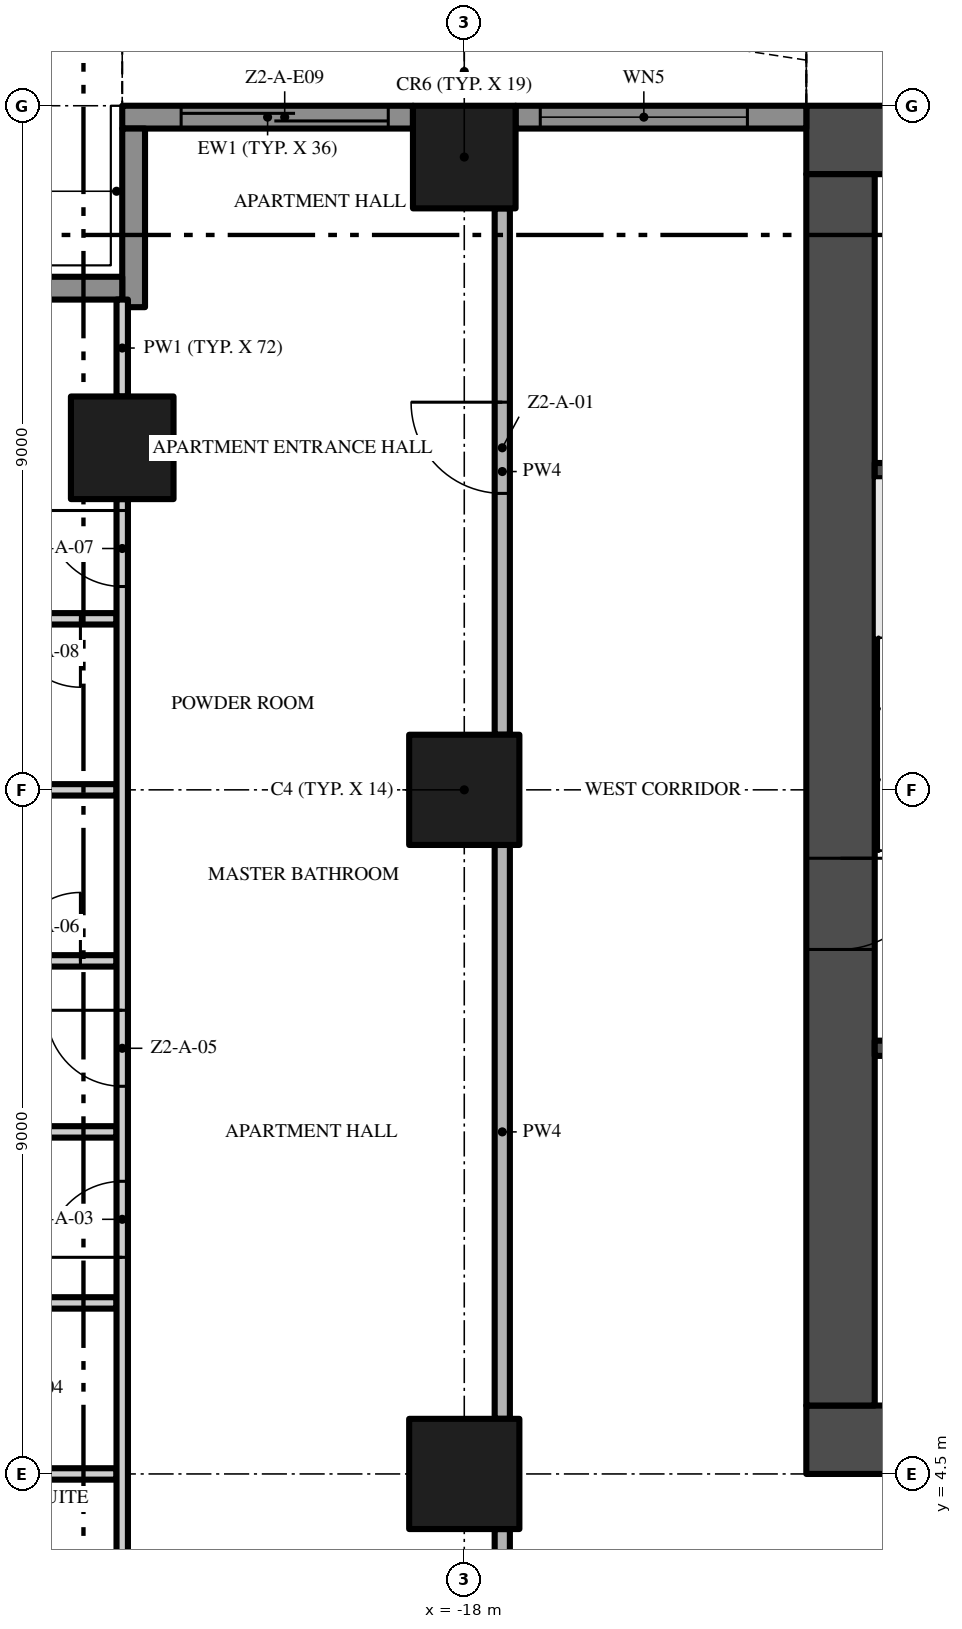
"""IFC4 building model, lengths in metres.
Left out: names, types, materials, properties, quantities, classifications, styles, units other than length and angle.
Written with IfcOpenShell. Run it as: python <this file> out.ifc"""

import sys

from ifc_helpers import new_model, si_unit, direction, frame, frame_2d, origin, origin_2d, place, context, subcontext, project, spatial, polyline, rectangle, outline, extrude, element, fill, save


model = new_model("IFC4")
c1 = context("Model", 3, precision=1e-05, world=origin(), true_north=direction((0.0, 1.0)))
c2 = subcontext(c1, "Body", "Model", "MODEL_VIEW")
j1 = project(units=[si_unit("LENGTHUNIT", "METRE"), si_unit("PLANEANGLEUNIT", "RADIAN")], contexts=[c1])
p1 = place(None, origin())
s1 = spatial("IfcSite", under=j1, at=p1, CompositionType="ELEMENT")
p2 = place(p1, origin())
s2 = spatial("IfcBuilding", under=s1, at=p2, CompositionType="ELEMENT")
p3 = place(p2, frame((0.0, 0.0, 69.4)))
s3 = spatial("IfcBuildingStorey", under=s2, at=p3, CompositionType="ELEMENT", Elevation=69.4)
p4 = place(p3, frame((-13.5, 4.95, -0.3), z_axis=(0.0, 0.0, 1.0), x_axis=(1.0, 0.0, 0.0)))
e1 = element("IfcWall", 1, at=p4, inside=s3, PredefinedType="SHEAR", context=c2, shape_type="SweptSolid", body=[
    extrude(rectangle(XDim=27.0, YDim=0.9, at=frame_2d((13.5, 0.0))), origin(), (0.0, 0.0, 1.0), 3.8),
])
p5 = place(p4, frame((12.0, 0.0, 0.3)))
e2 = element("IfcOpeningElement", 2, at=p5, cuts=e1, PredefinedType="OPENING", context=c2, shape_type="SweptSolid", body=[
    extrude(rectangle(XDim=3.0, YDim=2.4, at=frame_2d((1.5, 1.2))), frame((0.0, 0.46, 0.0), z_axis=(0.0, -1.0, 0.0), x_axis=(1.0, 0.0, 0.0)), (0.0, 0.0, 1.0), 0.92),
])
p6 = place(p4, frame((4.9, 0.0, 0.3)))
e3 = element("IfcOpeningElement", 3, at=p6, cuts=e1, PredefinedType="OPENING", context=c2, shape_type="SweptSolid", body=[
    extrude(rectangle(XDim=1.2, YDim=2.2, at=frame_2d((0.6, 1.1))), frame((0.0, 0.46, 0.0), z_axis=(0.0, -1.0, 0.0), x_axis=(1.0, 0.0, 0.0)), (0.0, 0.0, 1.0), 0.92),
])
p7 = place(p4, frame((20.75, 0.0, 0.3)))
e4 = element("IfcOpeningElement", 4, at=p7, cuts=e1, PredefinedType="OPENING", context=c2, shape_type="SweptSolid", body=[
    extrude(rectangle(XDim=1.5, YDim=2.2, at=frame_2d((0.75, 1.1))), frame((0.0, 0.46, 0.0), z_axis=(0.0, -1.0, 0.0), x_axis=(1.0, 0.0, 0.0)), (0.0, 0.0, 1.0), 0.92),
])
p8 = place(p4, frame((17.4, 0.0, 0.3)))
e5 = element("IfcOpeningElement", 5, at=p8, cuts=e1, PredefinedType="OPENING", context=c2, shape_type="SweptSolid", body=[
    extrude(rectangle(XDim=1.2, YDim=2.2, at=frame_2d((0.6, 1.1))), frame((0.0, 0.46, 0.0), z_axis=(0.0, -1.0, 0.0), x_axis=(1.0, 0.0, 0.0)), (0.0, 0.0, 1.0), 0.92),
])
p9 = place(p3, frame((13.5, 22.05, -0.3), z_axis=(0.0, 0.0, 1.0), x_axis=(-1.0, 0.0, 0.0)))
e6 = element("IfcWall", 6, at=p9, inside=s3, PredefinedType="SHEAR", context=c2, shape_type="SweptSolid", body=[
    extrude(rectangle(XDim=27.0, YDim=0.9, at=frame_2d((13.5, 0.0))), origin(), (0.0, 0.0, 1.0), 3.8),
])
p10 = place(p3, frame((-13.05, 21.6, -0.3), z_axis=(0.0, 0.0, 1.0), x_axis=(0.0, -1.0, 0.0)))
e7 = element("IfcWall", 7, at=p10, inside=s3, PredefinedType="SHEAR", context=c2, shape_type="SweptSolid", body=[
    extrude(rectangle(XDim=16.2, YDim=0.9, at=frame_2d((8.1, 0.0))), origin(), (0.0, 0.0, 1.0), 3.8),
])
p11 = place(p10, frame((9.0, 0.0, 0.3)))
e8 = element("IfcOpeningElement", 8, at=p11, cuts=e7, PredefinedType="OPENING", context=c2, shape_type="SweptSolid", body=[
    extrude(rectangle(XDim=1.2, YDim=2.2, at=frame_2d((0.6, 1.1))), frame((0.0, 0.46, 0.0), z_axis=(0.0, -1.0, 0.0), x_axis=(1.0, 0.0, 0.0)), (0.0, 0.0, 1.0), 0.92),
])
p12 = place(p3, frame((-18.0, 13.5, 0.0), z_axis=(0.0, 0.0, 1.0), x_axis=(1.0, 0.0, 0.0)))
e9 = element("IfcColumn", 9, at=p12, inside=s3, PredefinedType="COLUMN", context=c2, shape_type="SweptSolid", body=[
    extrude(rectangle(XDim=1.45, YDim=1.45, at=origin_2d()), origin(), (0.0, 0.0, 1.0), 3.5),
])
p13 = place(p3, frame((-18.0, 21.825, 0.0), z_axis=(0.0, 0.0, 1.0), x_axis=(1.0, 0.0, 0.0)))
e10 = element("IfcColumn", 10, at=p13, inside=s3, PredefinedType="COLUMN", context=c2, shape_type="SweptSolid", body=[
    extrude(rectangle(XDim=1.35, YDim=1.35, at=origin_2d()), origin(), (0.0, 0.0, 1.0), 3.5),
])
p14 = place(p3, frame((-18.0, 4.5, 0.0), z_axis=(0.0, 0.0, 1.0), x_axis=(1.0, 0.0, 0.0)))
e11 = element("IfcColumn", 11, at=p14, inside=s3, PredefinedType="COLUMN", context=c2, shape_type="SweptSolid", body=[
    extrude(rectangle(XDim=1.45, YDim=1.45, at=origin_2d()), origin(), (0.0, 0.0, 1.0), 3.5),
])
p15 = place(p3, frame((-22.5, 18.0, 0.0), z_axis=(0.0, 0.0, 1.0), x_axis=(1.0, 0.0, 0.0)))
e12 = element("IfcColumn", 12, at=p15, inside=s3, PredefinedType="COLUMN", context=c2, shape_type="SweptSolid", body=[
    extrude(rectangle(XDim=1.35, YDim=1.35, at=origin_2d()), origin(), (0.0, 0.0, 1.0), 3.5),
])
p16 = place(p3, frame((-17.325, 22.35, 0.0), z_axis=(0.0, 0.0, 1.0), x_axis=(1.0, 0.0, 0.0)))
e13 = element("IfcWall", 13, at=p16, inside=s3, PredefinedType="SOLIDWALL", context=c2, shape_type="SweptSolid", body=[
    extrude(rectangle(XDim=3.825, YDim=0.3, at=frame_2d((1.913, 0.0))), origin(), (0.0, 0.0, 1.0), 3.5),
])
p17 = place(p16, frame((0.325, 0.0, 0.45)))
e14 = element("IfcOpeningElement", 14, at=p17, cuts=e13, PredefinedType="OPENING", context=c2, shape_type="SweptSolid", body=[
    extrude(rectangle(XDim=2.725, YDim=2.65, at=frame_2d((1.363, 1.325))), frame((0.0, 0.16, 0.0), z_axis=(0.0, -1.0, 0.0), x_axis=(1.0, 0.0, 0.0)), (0.0, 0.0, 1.0), 0.32),
])
p18 = place(p3, frame((-22.5, 22.35, 0.0), z_axis=(0.0, 0.0, 1.0), x_axis=(1.0, 0.0, 0.0)))
e15 = element("IfcWall", 15, at=p18, inside=s3, PredefinedType="SOLIDWALL", context=c2, shape_type="SweptSolid", body=[
    extrude(rectangle(XDim=3.825, YDim=0.3, at=frame_2d((1.913, 0.0))), origin(), (0.0, 0.0, 1.0), 3.5),
])
p19 = place(p18, frame((0.775, 0.0, 0.0)))
e16 = element("IfcOpeningElement", 16, at=p19, cuts=e15, PredefinedType="OPENING", context=c2, shape_type="SweptSolid", body=[
    extrude(rectangle(XDim=2.725, YDim=2.4, at=frame_2d((1.363, 1.2))), frame((0.0, 0.16, 0.0), z_axis=(0.0, -1.0, 0.0), x_axis=(1.0, 0.0, 0.0)), (0.0, 0.0, 1.0), 0.32),
])
p20 = place(p3, frame((-22.35, 19.85, 0.0), z_axis=(0.0, 0.0, 1.0), x_axis=(0.0, 1.0, 0.0)))
e17 = element("IfcWall", 17, at=p20, inside=s3, PredefinedType="SOLIDWALL", context=c2, shape_type="SweptSolid", body=[
    extrude(rectangle(XDim=2.35, YDim=0.3, at=frame_2d((1.175, 0.0))), origin(), (0.0, 0.0, 1.0), 3.5),
])
p21 = place(p3, frame((-24.75, 20.1, 0.0), z_axis=(0.0, 0.0, 1.0), x_axis=(1.0, 0.0, 0.0)))
e18 = element("IfcWall", 18, at=p21, inside=s3, PredefinedType="SOLIDWALL", context=c2, shape_type="SweptSolid", body=[
    extrude(rectangle(XDim=2.25, YDim=0.3, at=frame_2d((1.125, 0.0))), origin(), (0.0, 0.0, 1.0), 3.5),
])
p22 = place(p3, origin())
e19 = element("IfcWall", 19, at=p22, inside=s3, PredefinedType="USERDEFINED", context=c2, shape_type="SweptSolid", body=[
    extrude(outline(polyline([(-13.5, 23.1), (-15.0, 23.329), (-16.5, 23.929), (-18.0, 24.671), (-19.5, 25.271), (-21.0, 25.5), (-22.5, 25.271), (-22.462, 25.024), (-21.0, 25.247), (-19.566, 25.028), (-18.102, 24.442), (-16.602, 23.701), (-15.066, 23.086), (-13.538, 22.853), (-13.5, 23.1)])), origin(), (0.0, 0.0, 1.0), 0.9),
])
for number, where, z_axis, x_axis in (
    (20, (-12.6, 10.1, 0.0), (0.0, 0.0, 1.0), (1.0, 0.0, 0.0)),
    (21, (-12.6, 17.7, 0.0), (0.0, 0.0, 1.0), (1.0, 0.0, 0.0)),
):
    element("IfcWall", number, at=place(p3, frame(where, z_axis=z_axis, x_axis=x_axis)), inside=s3, PredefinedType="SHEAR", context=c2, shape_type="SweptSolid", body=[
        extrude(rectangle(XDim=2.95, YDim=0.2, at=frame_2d((1.475, 0.0))), origin(), (0.0, 0.0, 1.0), 3.5),
    ])
p23 = place(p3, frame((-25.65, 4.5, 0.0), z_axis=(0.0, 0.0, 1.0), x_axis=(1.0, 0.0, 0.0)))
e22 = element("IfcWall", 22, at=p23, inside=s3, PredefinedType="PARTITIONING", context=c2, shape_type="SweptSolid", body=[
    extrude(rectangle(XDim=3.075, YDim=0.15, at=frame_2d((1.538, 0.0))), origin(), (0.0, 0.0, 1.0), 3.5),
])
p24 = place(p3, frame((-24.45, 6.75, 0.0), z_axis=(0.0, 0.0, 1.0), x_axis=(1.0, 0.0, 0.0)))
e23 = element("IfcWall", 23, at=p24, inside=s3, PredefinedType="PARTITIONING", context=c2, shape_type="SweptSolid", body=[
    extrude(rectangle(XDim=1.875, YDim=0.15, at=frame_2d((0.938, 0.0))), origin(), (0.0, 0.0, 1.0), 3.5),
])
p25 = place(p3, frame((-26.7, 9.0, 0.0), z_axis=(0.0, 0.0, 1.0), x_axis=(1.0, 0.0, 0.0)))
e24 = element("IfcWall", 24, at=p25, inside=s3, PredefinedType="PARTITIONING", context=c2, shape_type="SweptSolid", body=[
    extrude(rectangle(XDim=4.125, YDim=0.15, at=frame_2d((2.062, 0.0))), origin(), (0.0, 0.0, 1.0), 3.5),
])
p26 = place(p3, frame((-24.45, 11.25, 0.0), z_axis=(0.0, 0.0, 1.0), x_axis=(1.0, 0.0, 0.0)))
e25 = element("IfcWall", 25, at=p26, inside=s3, PredefinedType="PARTITIONING", context=c2, shape_type="SweptSolid", body=[
    extrude(rectangle(XDim=1.875, YDim=0.15, at=frame_2d((0.938, 0.0))), origin(), (0.0, 0.0, 1.0), 3.5),
])
p27 = place(p26, frame((0.5, 0.0, 0.0)))
e26 = element("IfcOpeningElement", 26, at=p27, cuts=e25, PredefinedType="OPENING", context=c2, shape_type="SweptSolid", body=[
    extrude(rectangle(XDim=0.9, YDim=2.1, at=frame_2d((0.45, 1.05))), frame((0.0, 0.085, 0.0), z_axis=(0.0, -1.0, 0.0), x_axis=(1.0, 0.0, 0.0)), (0.0, 0.0, 1.0), 0.17),
])
p28 = place(p3, frame((-24.45, 13.5, 0.0), z_axis=(0.0, 0.0, 1.0), x_axis=(1.0, 0.0, 0.0)))
e27 = element("IfcWall", 27, at=p28, inside=s3, PredefinedType="PARTITIONING", context=c2, shape_type="SweptSolid", body=[
    extrude(rectangle(XDim=1.875, YDim=0.15, at=frame_2d((0.938, 0.0))), origin(), (0.0, 0.0, 1.0), 3.5),
])
p29 = place(p3, frame((-22.575, 15.75, 0.0), z_axis=(0.0, 0.0, 1.0), x_axis=(-1.0, 0.0, 0.0)))
e28 = element("IfcWall", 28, at=p29, inside=s3, PredefinedType="PARTITIONING", context=c2, shape_type="SweptSolid", body=[
    extrude(rectangle(XDim=1.875, YDim=0.15, at=frame_2d((0.938, 0.0))), origin(), (0.0, 0.0, 1.0), 3.5),
])
p30 = place(p29, frame((0.475, 0.0, 0.0)))
e29 = element("IfcOpeningElement", 29, at=p30, cuts=e28, PredefinedType="OPENING", context=c2, shape_type="SweptSolid", body=[
    extrude(rectangle(XDim=0.9, YDim=2.1, at=frame_2d((0.45, 1.05))), frame((0.0, 0.085, 0.0), z_axis=(0.0, -1.0, 0.0), x_axis=(1.0, 0.0, 0.0)), (0.0, 0.0, 1.0), 0.17),
])
p31 = place(p3, frame((-22.5, 0.1, 0.0), z_axis=(0.0, 0.0, 1.0), x_axis=(0.0, 1.0, 0.0)))
e30 = element("IfcWall", 30, at=p31, inside=s3, PredefinedType="PARTITIONING", context=c2, shape_type="SweptSolid", body=[
    extrude(rectangle(XDim=17.225, YDim=0.15, at=frame_2d((8.613, 0.0))), origin(), (0.0, 0.0, 1.0), 3.5),
])
p32 = place(p31, frame((1.65, 0.0, 0.0)))
e31 = element("IfcOpeningElement", 31, at=p32, cuts=e30, PredefinedType="OPENING", context=c2, shape_type="SweptSolid", body=[
    extrude(rectangle(XDim=1.0, YDim=2.4, at=frame_2d((0.5, 1.2))), frame((0.0, 0.085, 0.0), z_axis=(0.0, -1.0, 0.0), x_axis=(1.0, 0.0, 0.0)), (0.0, 0.0, 1.0), 0.17),
])
p33 = place(p31, frame((7.25, 0.0, 0.0)))
e32 = element("IfcOpeningElement", 32, at=p33, cuts=e30, PredefinedType="OPENING", context=c2, shape_type="SweptSolid", body=[
    extrude(rectangle(XDim=1.0, YDim=2.4, at=frame_2d((0.5, 1.2))), frame((0.0, 0.085, 0.0), z_axis=(0.0, -1.0, 0.0), x_axis=(1.0, 0.0, 0.0)), (0.0, 0.0, 1.0), 0.17),
])
p34 = place(p31, frame((9.5, 0.0, 0.0)))
e33 = element("IfcOpeningElement", 33, at=p34, cuts=e30, PredefinedType="OPENING", context=c2, shape_type="SweptSolid", body=[
    extrude(rectangle(XDim=1.0, YDim=2.4, at=frame_2d((0.5, 1.2))), frame((0.0, 0.085, 0.0), z_axis=(0.0, -1.0, 0.0), x_axis=(1.0, 0.0, 0.0)), (0.0, 0.0, 1.0), 0.17),
])
p35 = place(p31, frame((16.075, 0.0, 0.0)))
e34 = element("IfcOpeningElement", 34, at=p35, cuts=e30, PredefinedType="OPENING", context=c2, shape_type="SweptSolid", body=[
    extrude(rectangle(XDim=1.0, YDim=2.4, at=frame_2d((0.5, 1.2))), frame((0.0, 0.085, 0.0), z_axis=(0.0, -1.0, 0.0), x_axis=(1.0, 0.0, 0.0)), (0.0, 0.0, 1.0), 0.17),
])
p36 = place(p3, frame((-22.5, 18.675, 0.0), z_axis=(0.0, 0.0, 1.0), x_axis=(0.0, 1.0, 0.0)))
e35 = element("IfcWall", 35, at=p36, inside=s3, PredefinedType="PARTITIONING", context=c2, shape_type="SweptSolid", body=[
    extrude(rectangle(XDim=1.275, YDim=0.15, at=frame_2d((0.637, 0.0))), origin(), (0.0, 0.0, 1.0), 3.5),
])
p37 = place(p3, frame((-17.5, -0.2, 0.0), z_axis=(0.0, 0.0, 1.0), x_axis=(0.0, 1.0, 0.0)))
e36 = element("IfcWall", 36, at=p37, inside=s3, PredefinedType="PARTITIONING", context=c2, shape_type="SweptSolid", body=[
    extrude(rectangle(XDim=3.975, YDim=0.2, at=frame_2d((1.988, 0.0))), origin(), (0.0, 0.0, 1.0), 3.5),
])
p38 = place(p3, frame((-17.5, 5.225, 0.0), z_axis=(0.0, 0.0, 1.0), x_axis=(0.0, 1.0, 0.0)))
e37 = element("IfcWall", 37, at=p38, inside=s3, PredefinedType="PARTITIONING", context=c2, shape_type="SweptSolid", body=[
    extrude(rectangle(XDim=7.55, YDim=0.2, at=frame_2d((3.775, 0.0))), origin(), (0.0, 0.0, 1.0), 3.5),
])
p39 = place(p3, frame((-17.5, 14.225, 0.0), z_axis=(0.0, 0.0, 1.0), x_axis=(0.0, 1.0, 0.0)))
e38 = element("IfcWall", 38, at=p39, inside=s3, PredefinedType="PARTITIONING", context=c2, shape_type="SweptSolid", body=[
    extrude(rectangle(XDim=6.925, YDim=0.2, at=frame_2d((3.462, 0.0))), origin(), (0.0, 0.0, 1.0), 3.5),
])
p40 = place(p39, frame((3.175, 0.0, 0.0)))
e39 = element("IfcOpeningElement", 39, at=p40, cuts=e38, PredefinedType="OPENING", context=c2, shape_type="SweptSolid", body=[
    extrude(rectangle(XDim=1.2, YDim=2.4, at=frame_2d((0.6, 1.2))), frame((0.0, 0.11, 0.0), z_axis=(0.0, -1.0, 0.0), x_axis=(1.0, 0.0, 0.0)), (0.0, 0.0, 1.0), 0.22),
])
p41 = place(p17, origin())
e40 = element("IfcWindow", 40, at=p41, inside=s3, PartitioningType="SINGLE_PANEL", PredefinedType="WINDOW", context=c2, shape_type="SweptSolid", body=[
    extrude(rectangle(XDim=2.725, YDim=2.65, at=frame_2d((1.363, 1.325))), frame((0.0, 0.03, 0.0), z_axis=(0.0, -1.0, 0.0), x_axis=(1.0, 0.0, 0.0)), (0.0, 0.0, 1.0), 0.06),
])
fill(e14, e40)
p42 = place(p19, origin())
e41 = element("IfcDoor", 41, at=p42, inside=s3, OperationType="SINGLE_SWING_LEFT", PredefinedType="DOOR", context=c2, shape_type="SweptSolid", body=[
    extrude(rectangle(XDim=2.725, YDim=2.4, at=frame_2d((1.363, 1.2))), frame((0.0, 0.025, 0.0), z_axis=(0.0, -1.0, 0.0), x_axis=(1.0, 0.0, 0.0)), (0.0, 0.0, 1.0), 0.05),
])
fill(e16, e41)
p43 = place(p11, frame((1.2, 0.0, 0.0), z_axis=(0.0, 0.0, 1.0), x_axis=(-1.0, 0.0, 0.0)))
e42 = element("IfcDoor", 42, at=p43, inside=s3, OperationType="SINGLE_SWING_RIGHT", PredefinedType="DOOR", context=c2, shape_type="SweptSolid", body=[
    extrude(rectangle(XDim=1.2, YDim=2.2, at=frame_2d((0.6, 1.1))), frame((0.0, 0.025, 0.0), z_axis=(0.0, -1.0, 0.0), x_axis=(1.0, 0.0, 0.0)), (0.0, 0.0, 1.0), 0.05),
])
fill(e8, e42)
p44 = place(p40, origin())
e43 = element("IfcDoor", 43, at=p44, inside=s3, OperationType="SINGLE_SWING_RIGHT", PredefinedType="DOOR", context=c2, shape_type="SweptSolid", body=[
    extrude(rectangle(XDim=1.2, YDim=2.4, at=frame_2d((0.6, 1.2))), frame((0.0, 0.025, 0.0), z_axis=(0.0, -1.0, 0.0), x_axis=(1.0, 0.0, 0.0)), (0.0, 0.0, 1.0), 0.05),
])
fill(e39, e43)
p45 = place(p33, origin())
e44 = element("IfcDoor", 44, at=p45, inside=s3, OperationType="SINGLE_SWING_LEFT", PredefinedType="DOOR", context=c2, shape_type="SweptSolid", body=[
    extrude(rectangle(XDim=1.0, YDim=2.4, at=frame_2d((0.5, 1.2))), frame((0.0, 0.025, 0.0), z_axis=(0.0, -1.0, 0.0), x_axis=(1.0, 0.0, 0.0)), (0.0, 0.0, 1.0), 0.05),
])
fill(e32, e44)
p46 = place(p34, origin())
e45 = element("IfcDoor", 45, at=p46, inside=s3, OperationType="SINGLE_SWING_RIGHT", PredefinedType="DOOR", context=c2, shape_type="SweptSolid", body=[
    extrude(rectangle(XDim=1.0, YDim=2.4, at=frame_2d((0.5, 1.2))), frame((0.0, 0.025, 0.0), z_axis=(0.0, -1.0, 0.0), x_axis=(1.0, 0.0, 0.0)), (0.0, 0.0, 1.0), 0.05),
])
fill(e33, e45)
p47 = place(p27, origin())
e46 = element("IfcDoor", 46, at=p47, inside=s3, OperationType="SINGLE_SWING_RIGHT", PredefinedType="DOOR", context=c2, shape_type="SweptSolid", body=[
    extrude(rectangle(XDim=0.9, YDim=2.1, at=frame_2d((0.45, 1.05))), frame((0.0, 0.025, 0.0), z_axis=(0.0, -1.0, 0.0), x_axis=(1.0, 0.0, 0.0)), (0.0, 0.0, 1.0), 0.05),
])
fill(e26, e46)
p48 = place(p35, origin())
e47 = element("IfcDoor", 47, at=p48, inside=s3, OperationType="SINGLE_SWING_RIGHT", PredefinedType="DOOR", context=c2, shape_type="SweptSolid", body=[
    extrude(rectangle(XDim=1.0, YDim=2.4, at=frame_2d((0.5, 1.2))), frame((0.0, 0.025, 0.0), z_axis=(0.0, -1.0, 0.0), x_axis=(1.0, 0.0, 0.0)), (0.0, 0.0, 1.0), 0.05),
])
fill(e34, e47)
p49 = place(p30, origin())
e48 = element("IfcDoor", 48, at=p49, inside=s3, OperationType="SINGLE_SWING_LEFT", PredefinedType="DOOR", context=c2, shape_type="SweptSolid", body=[
    extrude(rectangle(XDim=0.9, YDim=2.1, at=frame_2d((0.45, 1.05))), frame((0.0, 0.025, 0.0), z_axis=(0.0, -1.0, 0.0), x_axis=(1.0, 0.0, 0.0)), (0.0, 0.0, 1.0), 0.05),
])
fill(e29, e48)
save(model, sys.argv[1])
